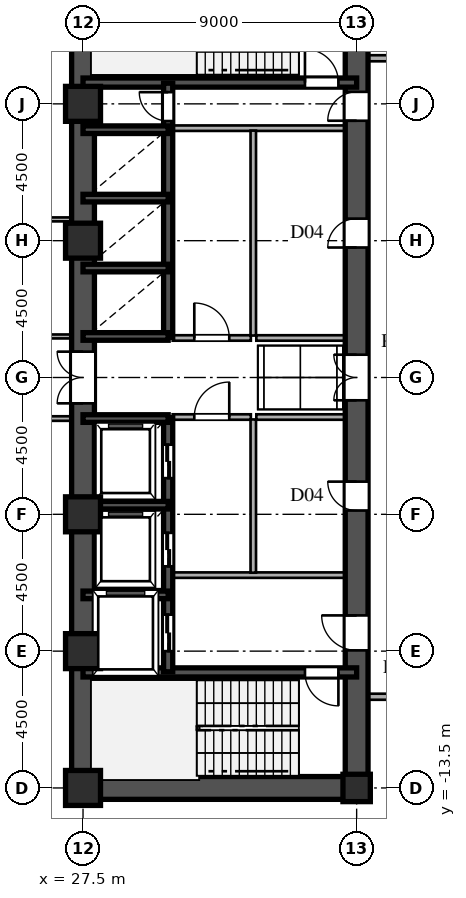
"""IFC4 building model, lengths in metres.
Left out: names, types, materials, properties, quantities, classifications, styles, units other than length and angle.
Written with IfcOpenShell. Run it as: python <this file> out.ifc"""

import sys

from ifc_helpers import new_model, si_unit, direction, frame, frame_2d, origin, origin_2d, place, context, subcontext, project, spatial, rectangle, hollow_rectangle, i_section, extrude, source, transform, mapped, element, fill, save


model = new_model("IFC4")
c1 = context("Model", 3, precision=1e-05, world=origin(), true_north=direction((0.0, 1.0)))
c2 = subcontext(c1, "Body", "Model", "MODEL_VIEW")
j1 = project(units=[si_unit("LENGTHUNIT", "METRE"), si_unit("PLANEANGLEUNIT", "RADIAN")], contexts=[c1])
p1 = place(None, origin())
s1 = spatial("IfcSite", under=j1, at=p1, CompositionType="ELEMENT")
p2 = place(p1, origin())
s2 = spatial("IfcBuilding", under=s1, at=p2, CompositionType="ELEMENT")
p3 = place(p2, frame((0.0, 0.0, 9.9)))
s3 = spatial("IfcBuildingStorey", under=s2, at=p3, CompositionType="ELEMENT", Elevation=9.9)
m1 = source(origin(), c2, "Body", "SweptSolid", [
    extrude(hollow_rectangle(XDim=1.15, YDim=1.15, WallThickness=0.048, at=origin_2d()), origin(), (0.0, 0.0, 1.0), 4.5),
])
for number, where, z_axis, x_axis in (
    (1, (27.5, -13.5, 0.0), (0.0, 0.0, 1.0), (1.0, 0.0, 0.0)),
    (2, (27.5, -9.0, 0.0), (0.0, 0.0, 1.0), (1.0, 0.0, 0.0)),
    (3, (27.5, -4.5, 0.0), (0.0, 0.0, 1.0), (1.0, 0.0, 0.0)),
    (4, (27.5, 4.5, 0.0), (0.0, 0.0, 1.0), (1.0, 0.0, 0.0)),
    (5, (27.5, 9.0, 0.0), (0.0, 0.0, 1.0), (1.0, 0.0, 0.0)),
):
    element("IfcColumn", number, at=place(p3, frame(where, z_axis=z_axis, x_axis=x_axis)), inside=s3, PredefinedType="COLUMN", context=c2, shape_type="MappedRepresentation", body=[
        mapped(m1, transform((0.0, 0.0, 0.0), scale=1.0)),
    ])
m2 = source(origin(), c2, "Body", "SweptSolid", [
    extrude(i_section(OverallWidth=0.9, OverallDepth=0.9, WebThickness=0.036, FlangeThickness=0.055, at=origin_2d()), origin(), (0.0, 0.0, 1.0), 4.5),
])
p4 = place(p3, frame((36.5, -13.5, 0.0), z_axis=(0.0, 0.0, 1.0), x_axis=(1.0, 0.0, 0.0)))
e6 = element("IfcColumn", 6, at=p4, inside=s3, PredefinedType="COLUMN", context=c2, shape_type="MappedRepresentation", body=[
    mapped(m2, transform((0.0, 0.0, 0.0), scale=1.0)),
])
for number, where, z_axis, x_axis in (
    (7, (27.5, -13.5, 0.0), (0.0, 0.0, 1.0), (0.0, 1.0, 0.0)),
    (8, (27.5, 1.3, 0.0), (0.0, 0.0, 1.0), (0.0, 1.0, 0.0)),
):
    element("IfcWall", number, at=place(p3, frame(where, z_axis=z_axis, x_axis=x_axis)), inside=s3, PredefinedType="SHEAR", context=c2, shape_type="SweptSolid", body=[
        extrude(rectangle(XDim=12.2, YDim=0.75, at=frame_2d((6.1, 0.0))), origin(), (0.0, 0.0, 1.0), 4.22),
    ])
p5 = place(p3, frame((27.5, -1.3, 0.0), z_axis=(0.0, 0.0, 1.0), x_axis=(0.0, 1.0, 0.0)))
e9 = element("IfcWall", 9, at=p5, inside=s3, PredefinedType="SHEAR", context=c2, shape_type="SweptSolid", body=[
    extrude(rectangle(XDim=2.6, YDim=0.75, at=frame_2d((1.3, 0.0))), origin(), (0.0, 0.0, 1.0), 4.22),
])
p6 = place(p5, frame((0.45, 0.0, 0.0)))
e10 = element("IfcOpeningElement", 10, at=p6, cuts=e9, PredefinedType="OPENING", context=c2, shape_type="SweptSolid", body=[
    extrude(rectangle(XDim=1.7, YDim=2.35, at=frame_2d((0.85, 1.175))), frame((0.0, 0.385, 0.0), z_axis=(0.0, -1.0, 0.0), x_axis=(1.0, 0.0, 0.0)), (0.0, 0.0, 1.0), 0.77),
])
p7 = place(p3, frame((27.5, -13.5, 0.0), z_axis=(0.0, 0.0, 1.0), x_axis=(1.0, 0.0, 0.0)))
e11 = element("IfcWall", 11, at=p7, inside=s3, PredefinedType="SHEAR", context=c2, shape_type="SweptSolid", body=[
    extrude(rectangle(XDim=9.0, YDim=0.75, at=frame_2d((4.5, 0.0))), origin(), (0.0, 0.0, 1.0), 4.22),
])
p8 = place(p3, frame((36.5, -13.65, 0.0), z_axis=(0.0, 0.0, 1.0), x_axis=(0.0, 1.0, 0.0)))
e12 = element("IfcWall", 12, at=p8, inside=s3, PredefinedType="SHEAR", context=c2, shape_type="SweptSolid", body=[
    extrude(rectangle(XDim=7.15, YDim=0.75, at=frame_2d((3.575, 0.0))), origin(), (0.0, 0.0, 1.0), 4.22),
])
p9 = place(p8, frame((4.675, 0.0, 0.0)))
e13 = element("IfcOpeningElement", 13, at=p9, cuts=e12, PredefinedType="OPENING", context=c2, shape_type="SweptSolid", body=[
    extrude(rectangle(XDim=1.15, YDim=2.2, at=frame_2d((0.575, 1.1))), frame((0.0, 0.385, 0.0), z_axis=(0.0, -1.0, 0.0), x_axis=(1.0, 0.0, 0.0)), (0.0, 0.0, 1.0), 0.77),
])
p10 = place(p3, frame((36.5, -1.3, 0.0), z_axis=(0.0, 0.0, 1.0), x_axis=(0.0, 1.0, 0.0)))
e14 = element("IfcWall", 14, at=p10, inside=s3, PredefinedType="SHEAR", context=c2, shape_type="SweptSolid", body=[
    extrude(rectangle(XDim=2.6, YDim=0.75, at=frame_2d((1.3, 0.0))), origin(), (0.0, 0.0, 1.0), 4.22),
])
p11 = place(p10, frame((0.55, 0.0, 0.0)))
e15 = element("IfcOpeningElement", 15, at=p11, cuts=e14, PredefinedType="OPENING", context=c2, shape_type="SweptSolid", body=[
    extrude(rectangle(XDim=1.5, YDim=2.3, at=frame_2d((0.75, 1.15))), frame((0.0, 0.385, 0.0), z_axis=(0.0, -1.0, 0.0), x_axis=(1.0, 0.0, 0.0)), (0.0, 0.0, 1.0), 0.77),
])
p12 = place(p3, frame((36.5, 8.2, 0.0), z_axis=(0.0, 0.0, 1.0), x_axis=(0.0, 1.0, 0.0)))
e16 = element("IfcWall", 16, at=p12, inside=s3, PredefinedType="SHEAR", context=c2, shape_type="SweptSolid", body=[
    extrude(rectangle(XDim=5.45, YDim=0.75, at=frame_2d((2.725, 0.0))), origin(), (0.0, 0.0, 1.0), 4.22),
])
p13 = place(p12, frame((0.245, 0.0, 0.0)))
e17 = element("IfcOpeningElement", 17, at=p13, cuts=e16, PredefinedType="OPENING", context=c2, shape_type="SweptSolid", body=[
    extrude(rectangle(XDim=0.95, YDim=2.15, at=frame_2d((0.475, 1.075))), frame((0.0, 0.385, 0.0), z_axis=(0.0, -1.0, 0.0), x_axis=(1.0, 0.0, 0.0)), (0.0, 0.0, 1.0), 0.77),
])
p14 = place(p3, frame((36.5, -6.5, 0.0), z_axis=(0.0, 0.0, 1.0), x_axis=(0.0, 1.0, 0.0)))
e18 = element("IfcWall", 18, at=p14, inside=s3, PredefinedType="SHEAR", context=c2, shape_type="SweptSolid", body=[
    extrude(rectangle(XDim=5.2, YDim=0.75, at=frame_2d((2.6, 0.0))), origin(), (0.0, 0.0, 1.0), 4.22),
])
p15 = place(p14, frame((2.125, 0.0, 0.0)))
e19 = element("IfcOpeningElement", 19, at=p15, cuts=e18, PredefinedType="OPENING", context=c2, shape_type="SweptSolid", body=[
    extrude(rectangle(XDim=0.95, YDim=2.15, at=frame_2d((0.475, 1.075))), frame((0.0, 0.385, 0.0), z_axis=(0.0, -1.0, 0.0), x_axis=(1.0, 0.0, 0.0)), (0.0, 0.0, 1.0), 0.77),
])
p16 = place(p3, frame((36.5, 1.3, 0.0), z_axis=(0.0, 0.0, 1.0), x_axis=(0.0, 1.0, 0.0)))
e20 = element("IfcWall", 20, at=p16, inside=s3, PredefinedType="SHEAR", context=c2, shape_type="SweptSolid", body=[
    extrude(rectangle(XDim=6.9, YDim=0.75, at=frame_2d((3.45, 0.0))), origin(), (0.0, 0.0, 1.0), 4.22),
])
p17 = place(p16, frame((2.975, 0.0, 0.0)))
e21 = element("IfcOpeningElement", 21, at=p17, cuts=e20, PredefinedType="OPENING", context=c2, shape_type="SweptSolid", body=[
    extrude(rectangle(XDim=0.95, YDim=2.15, at=frame_2d((0.475, 1.075))), frame((0.0, 0.385, 0.0), z_axis=(0.0, -1.0, 0.0), x_axis=(1.0, 0.0, 0.0)), (0.0, 0.0, 1.0), 0.77),
])
p18 = place(p3, frame((27.5, -9.7, 0.0), z_axis=(0.0, 0.0, 1.0), x_axis=(1.0, 0.0, 0.0)))
e22 = element("IfcWall", 22, at=p18, inside=s3, PredefinedType="SHEAR", context=c2, shape_type="SweptSolid", body=[
    extrude(rectangle(XDim=9.0, YDim=0.3, at=frame_2d((4.5, 0.0))), origin(), (0.0, 0.0, 1.0), 4.22),
])
p19 = place(p18, frame((7.3, 0.0, 0.0)))
e23 = element("IfcOpeningElement", 23, at=p19, cuts=e22, PredefinedType="OPENING", context=c2, shape_type="SweptSolid", body=[
    extrude(rectangle(XDim=1.1, YDim=2.2, at=frame_2d((0.55, 1.1))), frame((0.0, 0.16, 0.0), z_axis=(0.0, -1.0, 0.0), x_axis=(1.0, 0.0, 0.0)), (0.0, 0.0, 1.0), 0.32),
])
p20 = place(p3, frame((27.5, 9.7, 0.0), z_axis=(0.0, 0.0, 1.0), x_axis=(1.0, 0.0, 0.0)))
e24 = element("IfcWall", 24, at=p20, inside=s3, PredefinedType="SHEAR", context=c2, shape_type="SweptSolid", body=[
    extrude(rectangle(XDim=9.0, YDim=0.3, at=frame_2d((4.5, 0.0))), origin(), (0.0, 0.0, 1.0), 4.22),
])
p21 = place(p20, frame((7.3, 0.0, 0.0)))
e25 = element("IfcOpeningElement", 25, at=p21, cuts=e24, PredefinedType="OPENING", context=c2, shape_type="SweptSolid", body=[
    extrude(rectangle(XDim=1.1, YDim=2.2, at=frame_2d((0.55, 1.1))), frame((0.0, 0.16, 0.0), z_axis=(0.0, -1.0, 0.0), x_axis=(1.0, 0.0, 0.0)), (0.0, 0.0, 1.0), 0.32),
])
for number, where, z_axis, x_axis in (
    (26, (27.5, -7.15, 0.0), (0.0, 0.0, 1.0), (1.0, 0.0, 0.0)),
    (27, (27.5, -4.2, 0.0), (0.0, 0.0, 1.0), (1.0, 0.0, 0.0)),
    (28, (27.5, -1.35, 0.0), (0.0, 0.0, 1.0), (1.0, 0.0, 0.0)),
    (29, (27.5, 1.35, 0.0), (0.0, 0.0, 1.0), (1.0, 0.0, 0.0)),
    (30, (27.5, 3.6, 0.0), (0.0, 0.0, 1.0), (1.0, 0.0, 0.0)),
    (31, (27.5, 5.9, 0.0), (0.0, 0.0, 1.0), (1.0, 0.0, 0.0)),
    (32, (27.5, 8.15, 0.0), (0.0, 0.0, 1.0), (1.0, 0.0, 0.0)),
):
    element("IfcWall", number, at=place(p3, frame(where, z_axis=z_axis, x_axis=x_axis)), inside=s3, PredefinedType="SHEAR", context=c2, shape_type="SweptSolid", body=[
        extrude(rectangle(XDim=2.8, YDim=0.25, at=frame_2d((1.4, 0.0))), origin(), (0.0, 0.0, 1.0), 4.22),
    ])
p22 = place(p3, frame((30.3, -9.68, 0.0), z_axis=(0.0, 0.0, 1.0), x_axis=(0.0, 1.0, 0.0)))
e33 = element("IfcWall", 33, at=p22, inside=s3, PredefinedType="SHEAR", context=c2, shape_type="SweptSolid", body=[
    extrude(rectangle(XDim=2.56, YDim=0.3, at=frame_2d((1.28, 0.0))), origin(), (0.0, 0.0, 1.0), 4.22),
])
p23 = place(p22, frame((0.68, 0.0, 0.0)))
e34 = element("IfcOpeningElement", 34, at=p23, cuts=e33, PredefinedType="OPENING", context=c2, shape_type="SweptSolid", body=[
    extrude(rectangle(XDim=1.2, YDim=2.25, at=frame_2d((0.6, 1.125))), frame((0.0, 0.16, 0.0), z_axis=(0.0, -1.0, 0.0), x_axis=(1.0, 0.0, 0.0)), (0.0, 0.0, 1.0), 0.32),
])
p24 = place(p3, frame((30.3, -7.12, 0.0), z_axis=(0.0, 0.0, 1.0), x_axis=(0.0, 1.0, 0.0)))
e35 = element("IfcWall", 35, at=p24, inside=s3, PredefinedType="SHEAR", context=c2, shape_type="SweptSolid", body=[
    extrude(rectangle(XDim=2.92, YDim=0.3, at=frame_2d((1.46, 0.0))), origin(), (0.0, 0.0, 1.0), 4.22),
])
p25 = place(p24, frame((0.91, 0.0, 0.0)))
e36 = element("IfcOpeningElement", 36, at=p25, cuts=e35, PredefinedType="OPENING", context=c2, shape_type="SweptSolid", body=[
    extrude(rectangle(XDim=1.1, YDim=2.2, at=frame_2d((0.55, 1.1))), frame((0.0, 0.16, 0.0), z_axis=(0.0, -1.0, 0.0), x_axis=(1.0, 0.0, 0.0)), (0.0, 0.0, 1.0), 0.32),
])
p26 = place(p3, frame((30.3, -4.2, 0.0), z_axis=(0.0, 0.0, 1.0), x_axis=(0.0, 1.0, 0.0)))
e37 = element("IfcWall", 37, at=p26, inside=s3, PredefinedType="SHEAR", context=c2, shape_type="SweptSolid", body=[
    extrude(rectangle(XDim=2.88, YDim=0.3, at=frame_2d((1.44, 0.0))), origin(), (0.0, 0.0, 1.0), 4.22),
])
p27 = place(p26, frame((0.89, 0.0, 0.0)))
e38 = element("IfcOpeningElement", 38, at=p27, cuts=e37, PredefinedType="OPENING", context=c2, shape_type="SweptSolid", body=[
    extrude(rectangle(XDim=1.1, YDim=2.2, at=frame_2d((0.55, 1.1))), frame((0.0, 0.16, 0.0), z_axis=(0.0, -1.0, 0.0), x_axis=(1.0, 0.0, 0.0)), (0.0, 0.0, 1.0), 0.32),
])
p28 = place(p3, frame((30.3, 1.32, 0.0), z_axis=(0.0, 0.0, 1.0), x_axis=(0.0, 1.0, 0.0)))
e39 = element("IfcWall", 39, at=p28, inside=s3, PredefinedType="SHEAR", context=c2, shape_type="SweptSolid", body=[
    extrude(rectangle(XDim=2.28, YDim=0.3, at=frame_2d((1.14, 0.0))), origin(), (0.0, 0.0, 1.0), 4.22),
])
p29 = place(p3, frame((30.3, 3.6, 0.0), z_axis=(0.0, 0.0, 1.0), x_axis=(0.0, 1.0, 0.0)))
e40 = element("IfcWall", 40, at=p29, inside=s3, PredefinedType="SHEAR", context=c2, shape_type="SweptSolid", body=[
    extrude(rectangle(XDim=2.3, YDim=0.3, at=frame_2d((1.15, 0.0))), origin(), (0.0, 0.0, 1.0), 4.22),
])
p30 = place(p3, frame((30.3, 5.9, 0.0), z_axis=(0.0, 0.0, 1.0), x_axis=(0.0, 1.0, 0.0)))
e41 = element("IfcWall", 41, at=p30, inside=s3, PredefinedType="SHEAR", context=c2, shape_type="SweptSolid", body=[
    extrude(rectangle(XDim=2.25, YDim=0.3, at=frame_2d((1.125, 0.0))), origin(), (0.0, 0.0, 1.0), 4.22),
])
p31 = place(p3, frame((30.3, 8.15, 0.0), z_axis=(0.0, 0.0, 1.0), x_axis=(0.0, 1.0, 0.0)))
e42 = element("IfcWall", 42, at=p31, inside=s3, PredefinedType="SHEAR", context=c2, shape_type="SweptSolid", body=[
    extrude(rectangle(XDim=1.53, YDim=0.3, at=frame_2d((0.765, 0.0))), origin(), (0.0, 0.0, 1.0), 4.22),
])
p32 = place(p31, frame((0.285, 0.0, 0.0)))
e43 = element("IfcOpeningElement", 43, at=p32, cuts=e42, PredefinedType="OPENING", context=c2, shape_type="SweptSolid", body=[
    extrude(rectangle(XDim=0.95, YDim=2.15, at=frame_2d((0.475, 1.075))), frame((0.0, 0.16, 0.0), z_axis=(0.0, -1.0, 0.0), x_axis=(1.0, 0.0, 0.0)), (0.0, 0.0, 1.0), 0.32),
])
for number, where, z_axis, x_axis in (
    (44, (30.45, -6.5, 0.0), (0.0, 0.0, 1.0), (1.0, 0.0, 0.0)),
    (45, (30.45, 8.2, 0.0), (0.0, 0.0, 1.0), (1.0, 0.0, 0.0)),
):
    element("IfcWall", number, at=place(p3, frame(where, z_axis=z_axis, x_axis=x_axis)), inside=s3, PredefinedType="PARTITIONING", context=c2, shape_type="SweptSolid", body=[
        extrude(rectangle(XDim=5.7, YDim=0.18, at=frame_2d((2.85, 0.0))), origin(), (0.0, 0.0, 1.0), 4.22),
    ])
p33 = place(p3, frame((33.1, -6.42, 0.0), z_axis=(0.0, 0.0, 1.0), x_axis=(0.0, 1.0, 0.0)))
e46 = element("IfcWall", 46, at=p33, inside=s3, PredefinedType="PARTITIONING", context=c2, shape_type="SweptSolid", body=[
    extrude(rectangle(XDim=5.04, YDim=0.18, at=frame_2d((2.52, 0.0))), origin(), (0.0, 0.0, 1.0), 4.22),
])
p34 = place(p3, frame((33.1, 1.38, 0.0), z_axis=(0.0, 0.0, 1.0), x_axis=(0.0, 1.0, 0.0)))
e47 = element("IfcWall", 47, at=p34, inside=s3, PredefinedType="PARTITIONING", context=c2, shape_type="SweptSolid", body=[
    extrude(rectangle(XDim=6.74, YDim=0.18, at=frame_2d((3.37, 0.0))), origin(), (0.0, 0.0, 1.0), 4.22),
])
p35 = place(p3, frame((30.45, -1.3, 0.0), z_axis=(0.0, 0.0, 1.0), x_axis=(1.0, 0.0, 0.0)))
e48 = element("IfcWall", 48, at=p35, inside=s3, PredefinedType="PARTITIONING", context=c2, shape_type="SweptSolid", body=[
    extrude(rectangle(XDim=2.57, YDim=0.18, at=frame_2d((1.285, 0.0))), origin(), (0.0, 0.0, 1.0), 4.22),
])
p36 = place(p35, frame((0.71, 0.0, 0.0)))
e49 = element("IfcOpeningElement", 49, at=p36, cuts=e48, PredefinedType="OPENING", context=c2, shape_type="SweptSolid", body=[
    extrude(rectangle(XDim=1.15, YDim=2.2, at=frame_2d((0.575, 1.1))), frame((0.0, 0.1, 0.0), z_axis=(0.0, -1.0, 0.0), x_axis=(1.0, 0.0, 0.0)), (0.0, 0.0, 1.0), 0.2),
])
p37 = place(p3, frame((30.45, 1.3, 0.0), z_axis=(0.0, 0.0, 1.0), x_axis=(1.0, 0.0, 0.0)))
e50 = element("IfcWall", 50, at=p37, inside=s3, PredefinedType="PARTITIONING", context=c2, shape_type="SweptSolid", body=[
    extrude(rectangle(XDim=2.57, YDim=0.18, at=frame_2d((1.285, 0.0))), origin(), (0.0, 0.0, 1.0), 4.22),
])
p38 = place(p37, frame((0.71, 0.0, 0.0)))
e51 = element("IfcOpeningElement", 51, at=p38, cuts=e50, PredefinedType="OPENING", context=c2, shape_type="SweptSolid", body=[
    extrude(rectangle(XDim=1.15, YDim=2.2, at=frame_2d((0.575, 1.1))), frame((0.0, 0.1, 0.0), z_axis=(0.0, -1.0, 0.0), x_axis=(1.0, 0.0, 0.0)), (0.0, 0.0, 1.0), 0.2),
])
for number, where, z_axis, x_axis in (
    (52, (33.2, -1.3, 0.0), (0.0, 0.0, 1.0), (1.0, 0.0, 0.0)),
    (53, (33.2, 1.3, 0.0), (0.0, 0.0, 1.0), (1.0, 0.0, 0.0)),
):
    element("IfcWall", number, at=place(p3, frame(where, z_axis=z_axis, x_axis=x_axis)), inside=s3, PredefinedType="PARTITIONING", context=c2, shape_type="SweptSolid", body=[
        extrude(rectangle(XDim=2.95, YDim=0.18, at=frame_2d((1.475, 0.0))), origin(), (0.0, 0.0, 1.0), 4.22),
    ])
p39 = place(p3, frame((36.88, -10.5, 0.0), z_axis=(0.0, 0.0, 1.0), x_axis=(1.0, 0.0, 0.0)))
e54 = element("IfcWall", 54, at=p39, inside=s3, PredefinedType="PARTITIONING", context=c2, shape_type="SweptSolid", body=[
    extrude(rectangle(XDim=2.035, YDim=0.2, at=frame_2d((1.018, 0.0))), origin(), (0.0, 0.0, 1.0), 4.22),
])
p40 = place(p3, frame((12.885, -1.35, 0.0), z_axis=(0.0, 0.0, 1.0), x_axis=(1.0, 0.0, 0.0)))
e55 = element("IfcWall", 55, at=p40, inside=s3, PredefinedType="PARTITIONING", context=c2, shape_type="SweptSolid", body=[
    extrude(rectangle(XDim=14.235, YDim=0.15, at=frame_2d((7.118, 0.0))), origin(), (0.0, 0.0, 1.0), 4.22),
])
p41 = place(p3, frame((12.885, 1.35, 0.0), z_axis=(0.0, 0.0, 1.0), x_axis=(1.0, 0.0, 0.0)))
e56 = element("IfcWall", 56, at=p41, inside=s3, PredefinedType="PARTITIONING", context=c2, shape_type="SweptSolid", body=[
    extrude(rectangle(XDim=14.235, YDim=0.13, at=frame_2d((7.118, 0.0))), origin(), (0.0, 0.0, 1.0), 4.22),
])
p42 = place(p41, frame((7.425, 0.0, 0.0)))
e57 = element("IfcOpeningElement", 57, at=p42, cuts=e56, PredefinedType="OPENING", context=c2, shape_type="SweptSolid", body=[
    extrude(rectangle(XDim=0.88, YDim=2.1, at=frame_2d((0.44, 1.05))), frame((0.0, 0.075, 0.0), z_axis=(0.0, -1.0, 0.0), x_axis=(1.0, 0.0, 0.0)), (0.0, 0.0, 1.0), 0.15),
])
p43 = place(p41, frame((11.775, 0.0, 0.0)))
e58 = element("IfcOpeningElement", 58, at=p43, cuts=e56, PredefinedType="OPENING", context=c2, shape_type="SweptSolid", body=[
    extrude(rectangle(XDim=0.88, YDim=2.1, at=frame_2d((0.44, 1.05))), frame((0.0, 0.075, 0.0), z_axis=(0.0, -1.0, 0.0), x_axis=(1.0, 0.0, 0.0)), (0.0, 0.0, 1.0), 0.15),
])
p44 = place(p3, frame((18.585, 5.2, 0.0), z_axis=(0.0, 0.0, 1.0), x_axis=(1.0, 0.0, 0.0)))
e59 = element("IfcWall", 59, at=p44, inside=s3, PredefinedType="PARTITIONING", context=c2, shape_type="SweptSolid", body=[
    extrude(rectangle(XDim=8.535, YDim=0.13, at=frame_2d((4.268, 0.0))), origin(), (0.0, 0.0, 1.0), 4.22),
])
p45 = place(p3, frame((36.88, 10.5, 0.0), z_axis=(0.0, 0.0, 1.0), x_axis=(1.0, 0.0, 0.0)))
e60 = element("IfcWall", 60, at=p45, inside=s3, PredefinedType="PARTITIONING", context=c2, shape_type="SweptSolid", body=[
    extrude(rectangle(XDim=2.035, YDim=0.2, at=frame_2d((1.018, 0.0))), origin(), (0.0, 0.0, 1.0), 4.22),
])
m3 = source(origin(), c2, "Body", "SweptSolid", [
    extrude(rectangle(XDim=1.7, YDim=2.35, at=frame_2d((0.85, 1.175))), frame((0.0, 0.025, 0.0), z_axis=(0.0, -1.0, 0.0), x_axis=(1.0, 0.0, 0.0)), (0.0, 0.0, 1.0), 0.05),
])
p46 = place(p6, origin())
e61 = element("IfcDoor", 61, at=p46, inside=s3, OperationType="DOUBLE_SWING_LEFT", PredefinedType="DOOR", context=c2, shape_type="MappedRepresentation", body=[
    mapped(m3, transform((0.0, 0.0, 0.0), scale=1.0)),
])
fill(e10, e61)
m4 = source(origin(), c2, "Body", "SweptSolid", [
    extrude(rectangle(XDim=1.15, YDim=2.2, at=frame_2d((0.575, 1.1))), frame((0.0, 0.025, 0.0), z_axis=(0.0, -1.0, 0.0), x_axis=(1.0, 0.0, 0.0)), (0.0, 0.0, 1.0), 0.05),
])
p47 = place(p9, origin())
e62 = element("IfcDoor", 62, at=p47, inside=s3, OperationType="SINGLE_SWING_RIGHT", PredefinedType="DOOR", context=c2, shape_type="MappedRepresentation", body=[
    mapped(m4, transform((0.0, 0.0, 0.0), scale=1.0)),
])
fill(e13, e62)
m5 = source(origin(), c2, "Body", "SweptSolid", [
    extrude(rectangle(XDim=1.5, YDim=2.3, at=frame_2d((0.75, 1.15))), frame((0.0, 0.025, 0.0), z_axis=(0.0, -1.0, 0.0), x_axis=(1.0, 0.0, 0.0)), (0.0, 0.0, 1.0), 0.05),
])
p48 = place(p11, origin())
e63 = element("IfcDoor", 63, at=p48, inside=s3, OperationType="DOUBLE_SWING_LEFT", PredefinedType="DOOR", context=c2, shape_type="MappedRepresentation", body=[
    mapped(m5, transform((0.0, 0.0, 0.0), scale=1.0)),
])
fill(e15, e63)
m6 = source(origin(), c2, "Body", "SweptSolid", [
    extrude(rectangle(XDim=0.95, YDim=2.15, at=frame_2d((0.475, 1.075))), frame((0.0, 0.025, 0.0), z_axis=(0.0, -1.0, 0.0), x_axis=(1.0, 0.0, 0.0)), (0.0, 0.0, 1.0), 0.05),
])
p49 = place(p13, origin())
e64 = element("IfcDoor", 64, at=p49, inside=s3, OperationType="SINGLE_SWING_LEFT", PredefinedType="DOOR", context=c2, shape_type="MappedRepresentation", body=[
    mapped(m6, transform((0.0, 0.0, 0.0), scale=1.0)),
])
fill(e17, e64)
p50 = place(p15, origin())
e65 = element("IfcDoor", 65, at=p50, inside=s3, OperationType="SINGLE_SWING_RIGHT", PredefinedType="DOOR", context=c2, shape_type="MappedRepresentation", body=[
    mapped(m6, transform((0.0, 0.0, 0.0), scale=1.0)),
])
fill(e19, e65)
p51 = place(p17, origin())
e66 = element("IfcDoor", 66, at=p51, inside=s3, OperationType="SINGLE_SWING_LEFT", PredefinedType="DOOR", context=c2, shape_type="MappedRepresentation", body=[
    mapped(m6, transform((0.0, 0.0, 0.0), scale=1.0)),
])
fill(e21, e66)
m7 = source(origin(), c2, "Body", "SweptSolid", [
    extrude(rectangle(XDim=1.1, YDim=2.2, at=frame_2d((0.55, 1.1))), frame((0.0, 0.025, 0.0), z_axis=(0.0, -1.0, 0.0), x_axis=(1.0, 0.0, 0.0)), (0.0, 0.0, 1.0), 0.05),
])
p52 = place(p19, frame((1.1, 0.0, 0.0), z_axis=(0.0, 0.0, 1.0), x_axis=(-1.0, 0.0, 0.0)))
e67 = element("IfcDoor", 67, at=p52, inside=s3, OperationType="SINGLE_SWING_RIGHT", PredefinedType="DOOR", context=c2, shape_type="MappedRepresentation", body=[
    mapped(m7, transform((0.0, 0.0, 0.0), scale=1.0)),
])
fill(e23, e67)
p53 = place(p21, origin())
e68 = element("IfcDoor", 68, at=p53, inside=s3, OperationType="SINGLE_SWING_LEFT", PredefinedType="DOOR", context=c2, shape_type="MappedRepresentation", body=[
    mapped(m7, transform((0.0, 0.0, 0.0), scale=1.0)),
])
fill(e25, e68)
m8 = source(origin(), c2, "Body", "SweptSolid", [
    extrude(rectangle(XDim=1.2, YDim=2.25, at=frame_2d((0.6, 1.125))), frame((0.0, 0.025, 0.0), z_axis=(0.0, -1.0, 0.0), x_axis=(1.0, 0.0, 0.0)), (0.0, 0.0, 1.0), 0.05),
])
p54 = place(p23, origin())
e69 = element("IfcDoor", 69, at=p54, inside=s3, OperationType="DOUBLE_DOOR_SLIDING", PredefinedType="DOOR", context=c2, shape_type="MappedRepresentation", body=[
    mapped(m8, transform((0.0, 0.0, 0.0), scale=1.0)),
])
fill(e34, e69)
m9 = source(origin(), c2, "Body", "SweptSolid", [
    extrude(rectangle(XDim=1.1, YDim=2.2, at=frame_2d((0.55, 1.1))), frame((0.0, 0.025, 0.0), z_axis=(0.0, -1.0, 0.0), x_axis=(1.0, 0.0, 0.0)), (0.0, 0.0, 1.0), 0.05),
])
p55 = place(p25, origin())
e70 = element("IfcDoor", 70, at=p55, inside=s3, OperationType="DOUBLE_DOOR_SLIDING", PredefinedType="DOOR", context=c2, shape_type="MappedRepresentation", body=[
    mapped(m9, transform((0.0, 0.0, 0.0), scale=1.0)),
])
fill(e36, e70)
p56 = place(p27, origin())
e71 = element("IfcDoor", 71, at=p56, inside=s3, OperationType="DOUBLE_DOOR_SLIDING", PredefinedType="DOOR", context=c2, shape_type="MappedRepresentation", body=[
    mapped(m9, transform((0.0, 0.0, 0.0), scale=1.0)),
])
fill(e38, e71)
p57 = place(p32, origin())
e72 = element("IfcDoor", 72, at=p57, inside=s3, OperationType="SINGLE_SWING_RIGHT", PredefinedType="DOOR", context=c2, shape_type="MappedRepresentation", body=[
    mapped(m6, transform((0.0, 0.0, 0.0), scale=1.0)),
])
fill(e43, e72)
p58 = place(p36, origin())
e73 = element("IfcDoor", 73, at=p58, inside=s3, OperationType="SINGLE_SWING_RIGHT", PredefinedType="DOOR", context=c2, shape_type="MappedRepresentation", body=[
    mapped(m4, transform((0.0, 0.0, 0.0), scale=1.0)),
])
fill(e49, e73)
p59 = place(p38, origin())
e74 = element("IfcDoor", 74, at=p59, inside=s3, OperationType="SINGLE_SWING_LEFT", PredefinedType="DOOR", context=c2, shape_type="MappedRepresentation", body=[
    mapped(m4, transform((0.0, 0.0, 0.0), scale=1.0)),
])
fill(e51, e74)
save(model, sys.argv[1])
